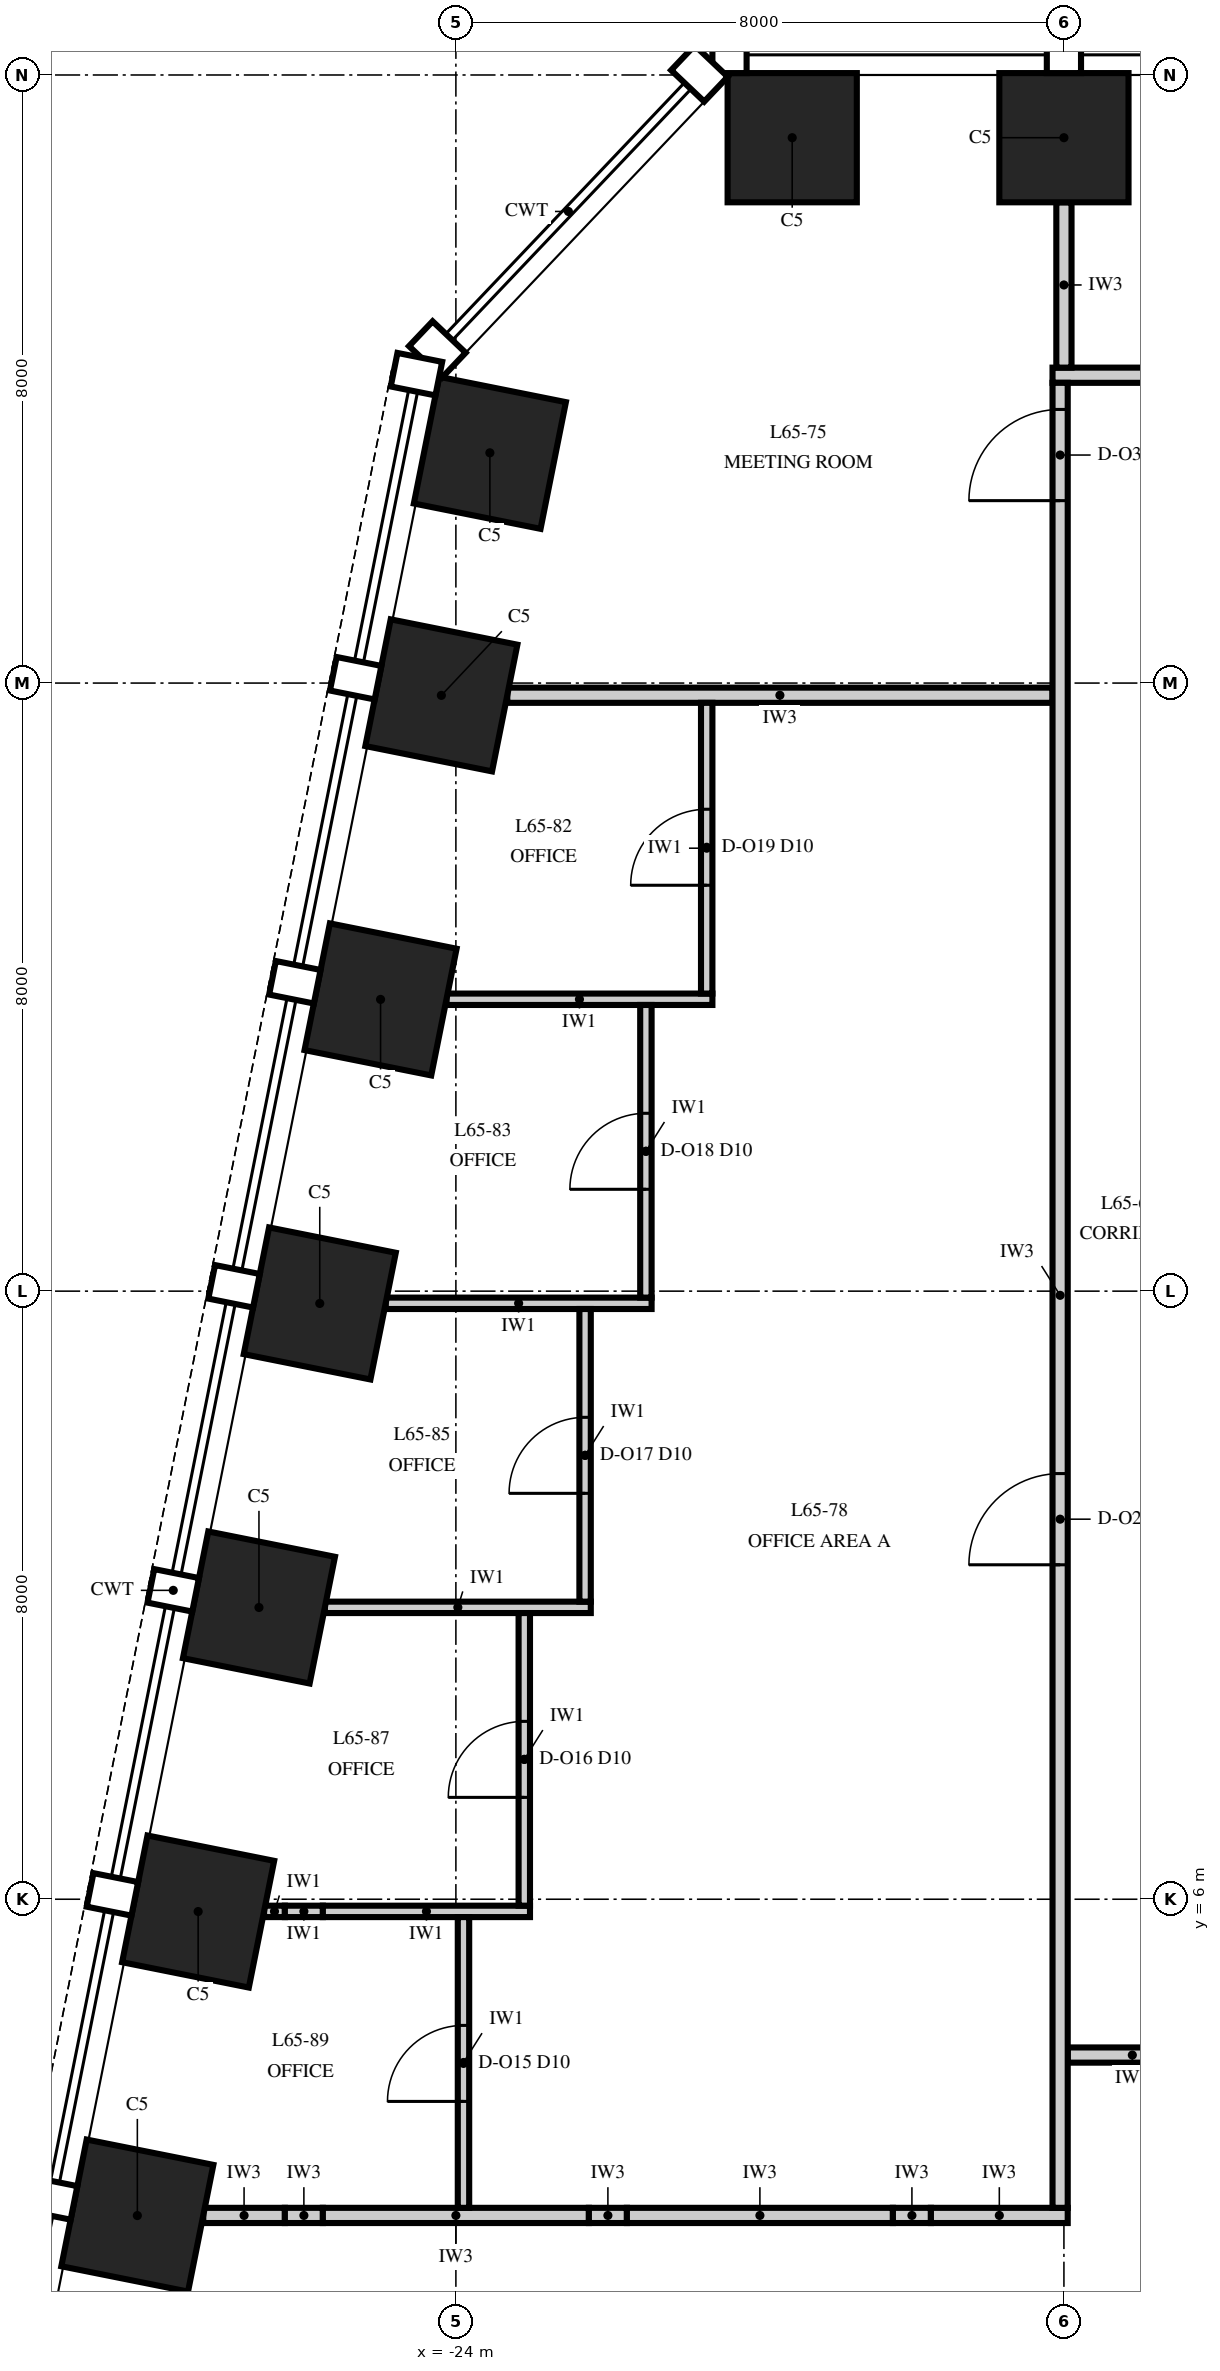
"""IFC4 building model, lengths in metres.
Left out: names, types, materials, properties, quantities, classifications, styles, units other than length and angle.
Written with IfcOpenShell. Run it as: python <this file> out.ifc"""

import sys

from ifc_helpers import new_model, si_unit, direction, frame, frame_2d, origin, origin_2d, place, context, subcontext, project, spatial, rectangle, extrude, element, fill, save


model = new_model("IFC4")
c1 = context("Model", 3, precision=1e-05, world=origin(), true_north=direction((0.0, 1.0)))
c2 = subcontext(c1, "Body", "Model", "MODEL_VIEW")
j1 = project(units=[si_unit("LENGTHUNIT", "METRE"), si_unit("PLANEANGLEUNIT", "RADIAN")], contexts=[c1])
p1 = place(None, origin())
s1 = spatial("IfcSite", under=j1, at=p1, CompositionType="ELEMENT")
p2 = place(p1, origin())
s2 = spatial("IfcBuilding", under=s1, at=p2, CompositionType="ELEMENT")
p3 = place(p2, frame((0.0, 0.0, 280.0)))
s3 = spatial("IfcBuildingStorey", under=s2, at=p3, CompositionType="ELEMENT", Elevation=280.0)
for number, where, z_axis, x_axis in (
    (1, (-16.0, 29.175, 0.0), (0.0, 0.0, 1.0), (-1.0, 0.0, 0.0)),
    (2, (-19.575, 29.175, 0.0), (0.0, 0.0, 1.0), (-1.0, 0.0, 0.0)),
    (3, (-23.553, 25.029, 0.0), (0.0, 0.0, 1.0), (-0.196, -0.981, 0.0)),
    (4, (-24.191, 21.838, 0.0), (0.0, 0.0, 1.0), (-0.196, -0.981, 0.0)),
    (5, (-24.991, 17.838, 0.0), (0.0, 0.0, 1.0), (-0.196, -0.981, 0.0)),
    (6, (-25.791, 13.838, 0.0), (0.0, 0.0, 1.0), (-0.196, -0.981, 0.0)),
    (7, (-26.591, 9.838, 0.0), (0.0, 0.0, 1.0), (-0.196, -0.981, 0.0)),
    (8, (-27.391, 5.838, 0.0), (0.0, 0.0, 1.0), (-0.196, -0.981, 0.0)),
    (9, (-28.191, 1.838, 0.0), (0.0, 0.0, 1.0), (-0.196, -0.981, 0.0)),
):
    element("IfcColumn", number, at=place(p3, frame(where, z_axis=z_axis, x_axis=x_axis)), inside=s3, PredefinedType="COLUMN", context=c2, shape_type="SweptSolid", body=[
        extrude(rectangle(XDim=1.7, YDim=1.7, at=origin_2d()), origin(), (0.0, 0.0, 1.0), 4.0),
    ])
p4 = place(p3, frame((-27.324, 1.84, 0.0), z_axis=(0.0, 0.0, 1.0), x_axis=(1.0, 0.0, 0.0)))
e10 = element("IfcWall", 10, at=p4, inside=s3, PredefinedType="PARTITIONING", context=c2, shape_type="SweptSolid", body=[
    extrude(rectangle(XDim=1.074, YDim=0.2, at=frame_2d((0.537, 0.0))), origin(), (0.0, 0.0, 1.0), 3.326),
])
p5 = place(p3, frame((-26.25, 1.84, 0.0), z_axis=(0.0, 0.0, 1.0), x_axis=(1.0, 0.0, 0.0)))
e11 = element("IfcWall", 11, at=p5, inside=s3, PredefinedType="PARTITIONING", context=c2, shape_type="SweptSolid", body=[
    extrude(rectangle(XDim=0.5, YDim=0.2, at=frame_2d((0.25, 0.0))), origin(), (0.0, 0.0, 1.0), 2.25),
])
p6 = place(p3, frame((-25.75, 1.84, 0.0), z_axis=(0.0, 0.0, 1.0), x_axis=(1.0, 0.0, 0.0)))
e12 = element("IfcWall", 12, at=p6, inside=s3, PredefinedType="PARTITIONING", context=c2, shape_type="SweptSolid", body=[
    extrude(rectangle(XDim=3.5, YDim=0.2, at=frame_2d((1.75, 0.0))), origin(), (0.0, 0.0, 1.0), 3.326),
])
p7 = place(p3, frame((-22.25, 1.84, 0.0), z_axis=(0.0, 0.0, 1.0), x_axis=(1.0, 0.0, 0.0)))
e13 = element("IfcWall", 13, at=p7, inside=s3, PredefinedType="PARTITIONING", context=c2, shape_type="SweptSolid", body=[
    extrude(rectangle(XDim=0.5, YDim=0.2, at=frame_2d((0.25, 0.0))), origin(), (0.0, 0.0, 1.0), 2.25),
])
p8 = place(p3, frame((-21.75, 1.84, 0.0), z_axis=(0.0, 0.0, 1.0), x_axis=(1.0, 0.0, 0.0)))
e14 = element("IfcWall", 14, at=p8, inside=s3, PredefinedType="PARTITIONING", context=c2, shape_type="SweptSolid", body=[
    extrude(rectangle(XDim=3.5, YDim=0.2, at=frame_2d((1.75, 0.0))), origin(), (0.0, 0.0, 1.0), 3.326),
])
p9 = place(p3, frame((-18.25, 1.84, 0.0), z_axis=(0.0, 0.0, 1.0), x_axis=(1.0, 0.0, 0.0)))
e15 = element("IfcWall", 15, at=p9, inside=s3, PredefinedType="PARTITIONING", context=c2, shape_type="SweptSolid", body=[
    extrude(rectangle(XDim=0.5, YDim=0.2, at=frame_2d((0.25, 0.0))), origin(), (0.0, 0.0, 1.0), 2.25),
])
p10 = place(p3, frame((-17.75, 1.84, 0.0), z_axis=(0.0, 0.0, 1.0), x_axis=(1.0, 0.0, 0.0)))
e16 = element("IfcWall", 16, at=p10, inside=s3, PredefinedType="PARTITIONING", context=c2, shape_type="SweptSolid", body=[
    extrude(rectangle(XDim=1.8, YDim=0.2, at=frame_2d((0.9, 0.0))), origin(), (0.0, 0.0, 1.0), 3.326),
])
p11 = place(p3, frame((-15.95, 3.95, 0.0), z_axis=(0.0, 0.0, 1.0), x_axis=(1.0, 0.0, 0.0)))
e17 = element("IfcWall", 17, at=p11, inside=s3, PredefinedType="PARTITIONING", context=c2, shape_type="SweptSolid", body=[
    extrude(rectangle(XDim=1.7, YDim=0.2, at=frame_2d((0.85, 0.0))), origin(), (0.0, 0.0, 1.0), 3.85),
])
p12 = place(p3, frame((-26.524, 5.84, 0.0), z_axis=(0.0, 0.0, 1.0), x_axis=(1.0, 0.0, 0.0)))
e18 = element("IfcWall", 18, at=p12, inside=s3, PredefinedType="PARTITIONING", context=c2, shape_type="SweptSolid", body=[
    extrude(rectangle(XDim=0.274, YDim=0.15, at=frame_2d((0.137, 0.0))), origin(), (0.0, 0.0, 1.0), 2.842),
])
p13 = place(p3, frame((-26.25, 5.84, 0.0), z_axis=(0.0, 0.0, 1.0), x_axis=(1.0, 0.0, 0.0)))
e19 = element("IfcWall", 19, at=p13, inside=s3, PredefinedType="PARTITIONING", context=c2, shape_type="SweptSolid", body=[
    extrude(rectangle(XDim=0.5, YDim=0.15, at=frame_2d((0.25, 0.0))), origin(), (0.0, 0.0, 1.0), 2.25),
])
p14 = place(p3, frame((-25.75, 5.84, 0.0), z_axis=(0.0, 0.0, 1.0), x_axis=(1.0, 0.0, 0.0)))
e20 = element("IfcWall", 20, at=p14, inside=s3, PredefinedType="PARTITIONING", context=c2, shape_type="SweptSolid", body=[
    extrude(rectangle(XDim=2.725, YDim=0.15, at=frame_2d((1.363, 0.0))), origin(), (0.0, 0.0, 1.0), 2.842),
])
for number, where, z_axis, x_axis in (
    (21, (-25.724, 9.84, 0.0), (0.0, 0.0, 1.0), (1.0, 0.0, 0.0)),
    (22, (-24.924, 13.84, 0.0), (0.0, 0.0, 1.0), (1.0, 0.0, 0.0)),
    (23, (-24.124, 17.84, 0.0), (0.0, 0.0, 1.0), (1.0, 0.0, 0.0)),
):
    element("IfcWall", number, at=place(p3, frame(where, z_axis=z_axis, x_axis=x_axis)), inside=s3, PredefinedType="PARTITIONING", context=c2, shape_type="SweptSolid", body=[
        extrude(rectangle(XDim=3.499, YDim=0.15, at=frame_2d((1.75, 0.0))), origin(), (0.0, 0.0, 1.0), 3.23),
    ])
p15 = place(p3, frame((-23.324, 21.84, 0.0), z_axis=(0.0, 0.0, 1.0), x_axis=(1.0, 0.0, 0.0)))
e24 = element("IfcWall", 24, at=p15, inside=s3, PredefinedType="PARTITIONING", context=c2, shape_type="SweptSolid", body=[
    extrude(rectangle(XDim=7.174, YDim=0.2, at=frame_2d((3.587, 0.0))), origin(), (0.0, 0.0, 1.0), 3.23),
])
p16 = place(p3, frame((-16.15, 26.05, 0.0), z_axis=(0.0, 0.0, 1.0), x_axis=(1.0, 0.0, 0.0)))
e25 = element("IfcWall", 25, at=p16, inside=s3, PredefinedType="PARTITIONING", context=c2, shape_type="SweptSolid", body=[
    extrude(rectangle(XDim=32.3, YDim=0.2, at=frame_2d((16.15, 0.0))), origin(), (0.0, 0.0, 1.0), 3.418),
])
p17 = place(p16, frame((1.55, 0.0, 0.0)))
e26 = element("IfcOpeningElement", 26, at=p17, cuts=e25, PredefinedType="OPENING", context=c2, shape_type="SweptSolid", body=[
    extrude(rectangle(XDim=1.2, YDim=2.4, at=frame_2d((0.6, 1.2))), frame((0.0, 0.115, 0.0), z_axis=(0.0, -1.0, 0.0), x_axis=(1.0, 0.0, 0.0)), (0.0, 0.0, 1.0), 0.23),
])
p18 = place(p16, frame((5.55, 0.0, 0.0)))
e27 = element("IfcOpeningElement", 27, at=p18, cuts=e25, PredefinedType="OPENING", context=c2, shape_type="SweptSolid", body=[
    extrude(rectangle(XDim=1.2, YDim=2.4, at=frame_2d((0.6, 1.2))), frame((0.0, 0.115, 0.0), z_axis=(0.0, -1.0, 0.0), x_axis=(1.0, 0.0, 0.0)), (0.0, 0.0, 1.0), 0.23),
])
p19 = place(p16, frame((9.55, 0.0, 0.0)))
e28 = element("IfcOpeningElement", 28, at=p19, cuts=e25, PredefinedType="OPENING", context=c2, shape_type="SweptSolid", body=[
    extrude(rectangle(XDim=1.2, YDim=2.4, at=frame_2d((0.6, 1.2))), frame((0.0, 0.115, 0.0), z_axis=(0.0, -1.0, 0.0), x_axis=(1.0, 0.0, 0.0)), (0.0, 0.0, 1.0), 0.23),
])
p20 = place(p16, frame((13.55, 0.0, 0.0)))
e29 = element("IfcOpeningElement", 29, at=p20, cuts=e25, PredefinedType="OPENING", context=c2, shape_type="SweptSolid", body=[
    extrude(rectangle(XDim=1.2, YDim=2.4, at=frame_2d((0.6, 1.2))), frame((0.0, 0.115, 0.0), z_axis=(0.0, -1.0, 0.0), x_axis=(1.0, 0.0, 0.0)), (0.0, 0.0, 1.0), 0.23),
])
p21 = place(p16, frame((17.55, 0.0, 0.0)))
e30 = element("IfcOpeningElement", 30, at=p21, cuts=e25, PredefinedType="OPENING", context=c2, shape_type="SweptSolid", body=[
    extrude(rectangle(XDim=1.2, YDim=2.4, at=frame_2d((0.6, 1.2))), frame((0.0, 0.115, 0.0), z_axis=(0.0, -1.0, 0.0), x_axis=(1.0, 0.0, 0.0)), (0.0, 0.0, 1.0), 0.23),
])
p22 = place(p16, frame((21.55, 0.0, 0.0)))
e31 = element("IfcOpeningElement", 31, at=p22, cuts=e25, PredefinedType="OPENING", context=c2, shape_type="SweptSolid", body=[
    extrude(rectangle(XDim=1.2, YDim=2.4, at=frame_2d((0.6, 1.2))), frame((0.0, 0.115, 0.0), z_axis=(0.0, -1.0, 0.0), x_axis=(1.0, 0.0, 0.0)), (0.0, 0.0, 1.0), 0.23),
])
p23 = place(p16, frame((25.55, 0.0, 0.0)))
e32 = element("IfcOpeningElement", 32, at=p23, cuts=e25, PredefinedType="OPENING", context=c2, shape_type="SweptSolid", body=[
    extrude(rectangle(XDim=1.2, YDim=2.4, at=frame_2d((0.6, 1.2))), frame((0.0, 0.115, 0.0), z_axis=(0.0, -1.0, 0.0), x_axis=(1.0, 0.0, 0.0)), (0.0, 0.0, 1.0), 0.23),
])
p24 = place(p16, frame((29.55, 0.0, 0.0)))
e33 = element("IfcOpeningElement", 33, at=p24, cuts=e25, PredefinedType="OPENING", context=c2, shape_type="SweptSolid", body=[
    extrude(rectangle(XDim=1.2, YDim=2.4, at=frame_2d((0.6, 1.2))), frame((0.0, 0.115, 0.0), z_axis=(0.0, -1.0, 0.0), x_axis=(1.0, 0.0, 0.0)), (0.0, 0.0, 1.0), 0.23),
])
p25 = place(p3, frame((-23.9, 1.94, 0.0), z_axis=(0.0, 0.0, 1.0), x_axis=(0.0, 1.0, 0.0)))
e34 = element("IfcWall", 34, at=p25, inside=s3, PredefinedType="PARTITIONING", context=c2, shape_type="SweptSolid", body=[
    extrude(rectangle(XDim=3.825, YDim=0.15, at=frame_2d((1.913, 0.0))), origin(), (0.0, 0.0, 1.0), 3.85),
])
p26 = place(p25, frame((1.4, 0.0, 0.0)))
e35 = element("IfcOpeningElement", 35, at=p26, cuts=e34, PredefinedType="OPENING", context=c2, shape_type="SweptSolid", body=[
    extrude(rectangle(XDim=1.0, YDim=2.3, at=frame_2d((0.5, 1.15))), frame((0.0, 0.09, 0.0), z_axis=(0.0, -1.0, 0.0), x_axis=(1.0, 0.0, 0.0)), (0.0, 0.0, 1.0), 0.18),
])
p27 = place(p3, frame((-23.1, 5.915, 0.0), z_axis=(0.0, 0.0, 1.0), x_axis=(0.0, 1.0, 0.0)))
e36 = element("IfcWall", 36, at=p27, inside=s3, PredefinedType="PARTITIONING", context=c2, shape_type="SweptSolid", body=[
    extrude(rectangle(XDim=3.85, YDim=0.15, at=frame_2d((1.925, 0.0))), origin(), (0.0, 0.0, 1.0), 2.842),
])
p28 = place(p27, frame((1.425, 0.0, 0.0)))
e37 = element("IfcOpeningElement", 37, at=p28, cuts=e36, PredefinedType="OPENING", context=c2, shape_type="SweptSolid", body=[
    extrude(rectangle(XDim=1.0, YDim=2.3, at=frame_2d((0.5, 1.15))), frame((0.0, 0.09, 0.0), z_axis=(0.0, -1.0, 0.0), x_axis=(1.0, 0.0, 0.0)), (0.0, 0.0, 1.0), 0.18),
])
p29 = place(p3, frame((-22.3, 9.915, 0.0), z_axis=(0.0, 0.0, 1.0), x_axis=(0.0, 1.0, 0.0)))
e38 = element("IfcWall", 38, at=p29, inside=s3, PredefinedType="PARTITIONING", context=c2, shape_type="SweptSolid", body=[
    extrude(rectangle(XDim=3.85, YDim=0.15, at=frame_2d((1.925, 0.0))), origin(), (0.0, 0.0, 1.0), 3.85),
])
p30 = place(p29, frame((1.425, 0.0, 0.0)))
e39 = element("IfcOpeningElement", 39, at=p30, cuts=e38, PredefinedType="OPENING", context=c2, shape_type="SweptSolid", body=[
    extrude(rectangle(XDim=1.0, YDim=2.3, at=frame_2d((0.5, 1.15))), frame((0.0, 0.09, 0.0), z_axis=(0.0, -1.0, 0.0), x_axis=(1.0, 0.0, 0.0)), (0.0, 0.0, 1.0), 0.18),
])
p31 = place(p3, frame((-21.5, 13.915, 0.0), z_axis=(0.0, 0.0, 1.0), x_axis=(0.0, 1.0, 0.0)))
e40 = element("IfcWall", 40, at=p31, inside=s3, PredefinedType="PARTITIONING", context=c2, shape_type="SweptSolid", body=[
    extrude(rectangle(XDim=3.85, YDim=0.15, at=frame_2d((1.925, 0.0))), origin(), (0.0, 0.0, 1.0), 3.23),
])
p32 = place(p31, frame((1.425, 0.0, 0.0)))
e41 = element("IfcOpeningElement", 41, at=p32, cuts=e40, PredefinedType="OPENING", context=c2, shape_type="SweptSolid", body=[
    extrude(rectangle(XDim=1.0, YDim=2.3, at=frame_2d((0.5, 1.15))), frame((0.0, 0.09, 0.0), z_axis=(0.0, -1.0, 0.0), x_axis=(1.0, 0.0, 0.0)), (0.0, 0.0, 1.0), 0.18),
])
p33 = place(p3, frame((-20.7, 17.915, 0.0), z_axis=(0.0, 0.0, 1.0), x_axis=(0.0, 1.0, 0.0)))
e42 = element("IfcWall", 42, at=p33, inside=s3, PredefinedType="PARTITIONING", context=c2, shape_type="SweptSolid", body=[
    extrude(rectangle(XDim=3.825, YDim=0.15, at=frame_2d((1.913, 0.0))), origin(), (0.0, 0.0, 1.0), 3.23),
])
p34 = place(p33, frame((1.425, 0.0, 0.0)))
e43 = element("IfcOpeningElement", 43, at=p34, cuts=e42, PredefinedType="OPENING", context=c2, shape_type="SweptSolid", body=[
    extrude(rectangle(XDim=1.0, YDim=2.3, at=frame_2d((0.5, 1.15))), frame((0.0, 0.09, 0.0), z_axis=(0.0, -1.0, 0.0), x_axis=(1.0, 0.0, 0.0)), (0.0, 0.0, 1.0), 0.18),
])
p35 = place(p3, frame((-16.05, 1.94, 0.0), z_axis=(0.0, 0.0, 1.0), x_axis=(0.0, 1.0, 0.0)))
e44 = element("IfcWall", 44, at=p35, inside=s3, PredefinedType="PARTITIONING", context=c2, shape_type="SweptSolid", body=[
    extrude(rectangle(XDim=24.01, YDim=0.2, at=frame_2d((12.005, 0.0))), origin(), (0.0, 0.0, 1.0), 2.842),
])
p36 = place(p35, frame((8.46, 0.0, 0.0)))
e45 = element("IfcOpeningElement", 45, at=p36, cuts=e44, PredefinedType="OPENING", context=c2, shape_type="SweptSolid", body=[
    extrude(rectangle(XDim=1.2, YDim=2.4, at=frame_2d((0.6, 1.2))), frame((0.0, 0.115, 0.0), z_axis=(0.0, -1.0, 0.0), x_axis=(1.0, 0.0, 0.0)), (0.0, 0.0, 1.0), 0.23),
])
p37 = place(p35, frame((22.46, 0.0, 0.0)))
e46 = element("IfcOpeningElement", 46, at=p37, cuts=e44, PredefinedType="OPENING", context=c2, shape_type="SweptSolid", body=[
    extrude(rectangle(XDim=1.2, YDim=2.4, at=frame_2d((0.6, 1.2))), frame((0.0, 0.115, 0.0), z_axis=(0.0, -1.0, 0.0), x_axis=(1.0, 0.0, 0.0)), (0.0, 0.0, 1.0), 0.23),
])
p38 = place(p3, frame((-16.0, 26.15, 0.0), z_axis=(0.0, 0.0, 1.0), x_axis=(0.0, 1.0, 0.0)))
e47 = element("IfcWall", 47, at=p38, inside=s3, PredefinedType="PARTITIONING", context=c2, shape_type="SweptSolid", body=[
    extrude(rectangle(XDim=2.175, YDim=0.2, at=frame_2d((1.087, 0.0))), origin(), (0.0, 0.0, 1.0), 3.418),
])
p39 = place(p26, origin())
e48 = element("IfcDoor", 48, at=p39, inside=s3, OperationType="SINGLE_SWING_LEFT", PredefinedType="DOOR", context=c2, shape_type="SweptSolid", body=[
    extrude(rectangle(XDim=1.0, YDim=2.3, at=frame_2d((0.5, 1.15))), frame((0.0, 0.075, 0.0), z_axis=(0.0, -1.0, 0.0), x_axis=(1.0, 0.0, 0.0)), (0.0, 0.0, 1.0), 0.149),
])
fill(e35, e48)
p40 = place(p28, origin())
e49 = element("IfcDoor", 49, at=p40, inside=s3, OperationType="SINGLE_SWING_LEFT", PredefinedType="DOOR", context=c2, shape_type="SweptSolid", body=[
    extrude(rectangle(XDim=1.0, YDim=2.3, at=frame_2d((0.5, 1.15))), frame((0.0, 0.075, 0.0), z_axis=(0.0, -1.0, 0.0), x_axis=(1.0, 0.0, 0.0)), (0.0, 0.0, 1.0), 0.149),
])
fill(e37, e49)
p41 = place(p30, origin())
e50 = element("IfcDoor", 50, at=p41, inside=s3, OperationType="SINGLE_SWING_LEFT", PredefinedType="DOOR", context=c2, shape_type="SweptSolid", body=[
    extrude(rectangle(XDim=1.0, YDim=2.3, at=frame_2d((0.5, 1.15))), frame((0.0, 0.075, 0.0), z_axis=(0.0, -1.0, 0.0), x_axis=(1.0, 0.0, 0.0)), (0.0, 0.0, 1.0), 0.149),
])
fill(e39, e50)
p42 = place(p32, origin())
e51 = element("IfcDoor", 51, at=p42, inside=s3, OperationType="SINGLE_SWING_LEFT", PredefinedType="DOOR", context=c2, shape_type="SweptSolid", body=[
    extrude(rectangle(XDim=1.0, YDim=2.3, at=frame_2d((0.5, 1.15))), frame((0.0, 0.075, 0.0), z_axis=(0.0, -1.0, 0.0), x_axis=(1.0, 0.0, 0.0)), (0.0, 0.0, 1.0), 0.149),
])
fill(e41, e51)
p43 = place(p34, origin())
e52 = element("IfcDoor", 52, at=p43, inside=s3, OperationType="SINGLE_SWING_LEFT", PredefinedType="DOOR", context=c2, shape_type="SweptSolid", body=[
    extrude(rectangle(XDim=1.0, YDim=2.3, at=frame_2d((0.5, 1.15))), frame((0.0, 0.075, 0.0), z_axis=(0.0, -1.0, 0.0), x_axis=(1.0, 0.0, 0.0)), (0.0, 0.0, 1.0), 0.149),
])
fill(e43, e52)
p44 = place(p36, origin())
e53 = element("IfcDoor", 53, at=p44, inside=s3, OperationType="SINGLE_SWING_LEFT", PredefinedType="DOOR", context=c2, shape_type="SweptSolid", body=[
    extrude(rectangle(XDim=1.2, YDim=2.4, at=frame_2d((0.6, 1.2))), frame((0.0, 0.1, 0.0), z_axis=(0.0, -1.0, 0.0), x_axis=(1.0, 0.0, 0.0)), (0.0, 0.0, 1.0), 0.199),
])
fill(e45, e53)
p45 = place(p37, origin())
e54 = element("IfcDoor", 54, at=p45, inside=s3, OperationType="SINGLE_SWING_LEFT", PredefinedType="DOOR", context=c2, shape_type="SweptSolid", body=[
    extrude(rectangle(XDim=1.2, YDim=2.4, at=frame_2d((0.6, 1.2))), frame((0.0, 0.1, 0.0), z_axis=(0.0, -1.0, 0.0), x_axis=(1.0, 0.0, 0.0)), (0.0, 0.0, 1.0), 0.199),
])
fill(e46, e54)
save(model, sys.argv[1])
